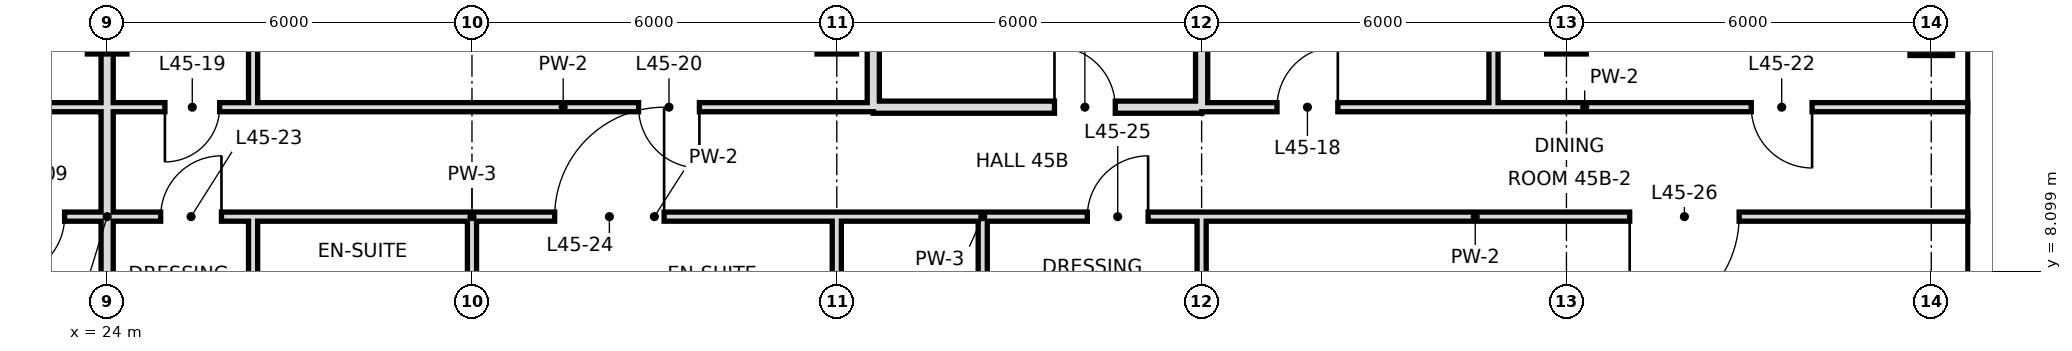
"""IFC4 building model, lengths in metres.
Left out: names, types, materials, properties, quantities, classifications, styles, units other than length and angle.
Written with IfcOpenShell. Run it as: python <this file> out.ifc"""

import sys

from ifc_helpers import new_model, si_unit, direction, frame, frame_2d, origin, origin_2d, place, context, subcontext, project, spatial, rectangle, hollow_rectangle, extrude, element, fill, save


model = new_model("IFC4")
c1 = context("Model", 3, precision=1e-05, world=origin(), true_north=direction((0.0, 1.0)))
c2 = subcontext(c1, "Body", "Model", "MODEL_VIEW")
j1 = project(units=[si_unit("LENGTHUNIT", "METRE"), si_unit("PLANEANGLEUNIT", "RADIAN")], contexts=[c1])
p1 = place(None, origin())
s1 = spatial("IfcSite", under=j1, at=p1, CompositionType="ELEMENT")
p2 = place(p1, origin())
s2 = spatial("IfcBuilding", under=s1, at=p2, CompositionType="ELEMENT")
p3 = place(p2, frame((0.0, 0.0, 195.6)))
s3 = spatial("IfcBuildingStorey", under=s2, at=p3, CompositionType="ELEMENT", Elevation=195.6)
for number, where, z_axis, x_axis in (
    (1, (24.0, 12.0, 0.0), (0.0, 0.0, 1.0), (1.0, 0.0, 0.0)),
    (2, (36.0, 12.0, 0.0), (0.0, 0.0, 1.0), (1.0, 0.0, 0.0)),
    (3, (48.0, 12.0, 0.0), (0.0, 0.0, 1.0), (1.0, 0.0, 0.0)),
):
    element("IfcColumn", number, at=place(p3, frame(where, z_axis=z_axis, x_axis=x_axis)), inside=s3, PredefinedType="COLUMN", context=c2, shape_type="SweptSolid", body=[
        extrude(hollow_rectangle(XDim=0.65, YDim=0.65, WallThickness=0.032, at=origin_2d()), origin(), (0.0, 0.0, 1.0), 3.6),
    ])
p4 = place(p3, frame((54.0, 12.0, 0.0), z_axis=(0.0, 0.0, 1.0), x_axis=(1.0, 0.0, 0.0)))
e4 = element("IfcColumn", 4, at=p4, inside=s3, PredefinedType="COLUMN", context=c2, shape_type="SweptSolid", body=[
    extrude(hollow_rectangle(XDim=0.7, YDim=0.7, WallThickness=0.036, at=origin_2d()), origin(), (0.0, 0.0, 1.0), 3.6),
])
p5 = place(p3, frame((24.0, 0.0, 0.0), z_axis=(0.0, 0.0, 1.0), x_axis=(0.0, 1.0, 0.0)))
e5 = element("IfcWall", 5, at=p5, inside=s3, PredefinedType="SOLIDWALL", context=c2, shape_type="SweptSolid", body=[
    extrude(rectangle(XDim=15.3, YDim=0.2, at=frame_2d((7.65, 0.0))), origin(), (0.0, 0.0, 1.0), 2.72),
])
p6 = place(p3, frame((26.4, 6.0, 0.0), z_axis=(0.0, 0.0, 1.0), x_axis=(0.0, 1.0, 0.0)))
e6 = element("IfcWall", 6, at=p6, inside=s3, PredefinedType="PARTITIONING", context=c2, shape_type="SweptSolid", body=[
    extrude(rectangle(XDim=3.0, YDim=0.15, at=frame_2d((1.5, 0.0))), origin(), (0.0, 0.0, 1.0), 3.42),
])
p7 = place(p3, frame((26.4, 10.8, 0.0), z_axis=(0.0, 0.0, 1.0), x_axis=(0.0, 1.0, 0.0)))
e7 = element("IfcWall", 7, at=p7, inside=s3, PredefinedType="PARTITIONING", context=c2, shape_type="SweptSolid", body=[
    extrude(rectangle(XDim=4.5, YDim=0.15, at=frame_2d((2.25, 0.0))), origin(), (0.0, 0.0, 1.0), 3.42),
])
for number, where, z_axis, x_axis in (
    (8, (30.0, 6.0, 0.0), (0.0, 0.0, 1.0), (0.0, 1.0, 0.0)),
    (9, (36.0, 6.0, 0.0), (0.0, 0.0, 1.0), (0.0, 1.0, 0.0)),
):
    element("IfcWall", number, at=place(p3, frame(where, z_axis=z_axis, x_axis=x_axis)), inside=s3, PredefinedType="PARTITIONING", context=c2, shape_type="SweptSolid", body=[
        extrude(rectangle(XDim=3.0, YDim=0.15, at=frame_2d((1.5, 0.0))), origin(), (0.0, 0.0, 1.0), 2.72),
    ])
p8 = place(p3, frame((36.6, 10.8, 0.0), z_axis=(0.0, 0.0, 1.0), x_axis=(0.0, 1.0, 0.0)))
e10 = element("IfcWall", 10, at=p8, inside=s3, PredefinedType="SOLIDWALL", context=c2, shape_type="SweptSolid", body=[
    extrude(rectangle(XDim=4.5, YDim=0.2, at=frame_2d((2.25, 0.0))), origin(), (0.0, 0.0, 1.0), 2.72),
])
p9 = place(p3, frame((38.4, 6.0, 0.0), z_axis=(0.0, 0.0, 1.0), x_axis=(0.0, 1.0, 0.0)))
e11 = element("IfcWall", 11, at=p9, inside=s3, PredefinedType="PARTITIONING", context=c2, shape_type="SweptSolid", body=[
    extrude(rectangle(XDim=3.0, YDim=0.15, at=frame_2d((1.5, 0.0))), origin(), (0.0, 0.0, 1.0), 3.42),
])
p10 = place(p3, frame((42.0, 10.8, 0.0), z_axis=(0.0, 0.0, 1.0), x_axis=(0.0, 1.0, 0.0)))
e12 = element("IfcWall", 12, at=p10, inside=s3, PredefinedType="SOLIDWALL", context=c2, shape_type="SweptSolid", body=[
    extrude(rectangle(XDim=4.5, YDim=0.2, at=frame_2d((2.25, 0.0))), origin(), (0.0, 0.0, 1.0), 2.72),
])
p11 = place(p3, frame((42.0, -0.6, 0.0), z_axis=(0.0, 0.0, 1.0), x_axis=(0.0, 1.0, 0.0)))
e13 = element("IfcWall", 13, at=p11, inside=s3, PredefinedType="PARTITIONING", context=c2, shape_type="SweptSolid", body=[
    extrude(rectangle(XDim=9.6, YDim=0.15, at=frame_2d((4.8, 0.0))), origin(), (0.0, 0.0, 1.0), 2.72),
])
p12 = place(p3, frame((46.8, 10.8, 0.0), z_axis=(0.0, 0.0, 1.0), x_axis=(0.0, 1.0, 0.0)))
e14 = element("IfcWall", 14, at=p12, inside=s3, PredefinedType="PARTITIONING", context=c2, shape_type="SweptSolid", body=[
    extrude(rectangle(XDim=4.5, YDim=0.15, at=frame_2d((2.25, 0.0))), origin(), (0.0, 0.0, 1.0), 3.42),
])
p13 = place(p3, frame((36.6, 10.8, 0.0), z_axis=(0.0, 0.0, 1.0), x_axis=(1.0, 0.0, 0.0)))
e15 = element("IfcWall", 15, at=p13, inside=s3, PredefinedType="SOLIDWALL", context=c2, shape_type="SweptSolid", body=[
    extrude(rectangle(XDim=5.4, YDim=0.2, at=frame_2d((2.7, 0.0))), origin(), (0.0, 0.0, 1.0), 2.72),
])
p14 = place(p13, frame((2.98, 0.0, 0.0)))
e16 = element("IfcOpeningElement", 16, at=p14, cuts=e15, PredefinedType="OPENING", context=c2, shape_type="SweptSolid", body=[
    extrude(rectangle(XDim=1.0, YDim=2.4, at=frame_2d((0.5, 1.2))), frame((0.0, 0.11, 0.0), z_axis=(0.0, -1.0, 0.0), x_axis=(1.0, 0.0, 0.0)), (0.0, 0.0, 1.0), 0.22),
])
p15 = place(p3, frame((7.8, 10.8, 0.0), z_axis=(0.0, 0.0, 1.0), x_axis=(1.0, 0.0, 0.0)))
e17 = element("IfcWall", 17, at=p15, inside=s3, PredefinedType="PARTITIONING", context=c2, shape_type="SweptSolid", body=[
    extrude(rectangle(XDim=16.2, YDim=0.15, at=frame_2d((8.1, 0.0))), origin(), (0.0, 0.0, 1.0), 3.42),
])
p16 = place(p15, frame((2.5, 0.0, 0.0)))
e18 = element("IfcOpeningElement", 18, at=p16, cuts=e17, PredefinedType="OPENING", context=c2, shape_type="SweptSolid", body=[
    extrude(rectangle(XDim=1.0, YDim=2.4, at=frame_2d((0.5, 1.2))), frame((0.0, 0.085, 0.0), z_axis=(0.0, -1.0, 0.0), x_axis=(1.0, 0.0, 0.0)), (0.0, 0.0, 1.0), 0.17),
])
p17 = place(p15, frame((8.86, 0.0, 0.0)))
e19 = element("IfcOpeningElement", 19, at=p17, cuts=e17, PredefinedType="OPENING", context=c2, shape_type="SweptSolid", body=[
    extrude(rectangle(XDim=1.0, YDim=2.4, at=frame_2d((0.5, 1.2))), frame((0.0, 0.085, 0.0), z_axis=(0.0, -1.0, 0.0), x_axis=(1.0, 0.0, 0.0)), (0.0, 0.0, 1.0), 0.17),
])
p18 = place(p3, frame((26.4, 10.8, 0.0), z_axis=(0.0, 0.0, 1.0), x_axis=(1.0, 0.0, 0.0)))
e20 = element("IfcWall", 20, at=p18, inside=s3, PredefinedType="PARTITIONING", context=c2, shape_type="SweptSolid", body=[
    extrude(rectangle(XDim=10.2, YDim=0.15, at=frame_2d((5.1, 0.0))), origin(), (0.0, 0.0, 1.0), 3.42),
])
p19 = place(p18, frame((6.34, 0.0, 0.0)))
e21 = element("IfcOpeningElement", 21, at=p19, cuts=e20, PredefinedType="OPENING", context=c2, shape_type="SweptSolid", body=[
    extrude(rectangle(XDim=1.0, YDim=2.4, at=frame_2d((0.5, 1.2))), frame((0.0, 0.085, 0.0), z_axis=(0.0, -1.0, 0.0), x_axis=(1.0, 0.0, 0.0)), (0.0, 0.0, 1.0), 0.17),
])
p20 = place(p3, frame((42.0, 10.8, 0.0), z_axis=(0.0, 0.0, 1.0), x_axis=(1.0, 0.0, 0.0)))
e22 = element("IfcWall", 22, at=p20, inside=s3, PredefinedType="PARTITIONING", context=c2, shape_type="SweptSolid", body=[
    extrude(rectangle(XDim=12.6, YDim=0.15, at=frame_2d((6.3, 0.0))), origin(), (0.0, 0.0, 1.0), 3.42),
])
p21 = place(p20, frame((1.24, 0.0, 0.0)))
e23 = element("IfcOpeningElement", 23, at=p21, cuts=e22, PredefinedType="OPENING", context=c2, shape_type="SweptSolid", body=[
    extrude(rectangle(XDim=1.0, YDim=2.4, at=frame_2d((0.5, 1.2))), frame((0.0, 0.085, 0.0), z_axis=(0.0, -1.0, 0.0), x_axis=(1.0, 0.0, 0.0)), (0.0, 0.0, 1.0), 0.17),
])
p22 = place(p20, frame((9.04, 0.0, 0.0)))
e24 = element("IfcOpeningElement", 24, at=p22, cuts=e22, PredefinedType="OPENING", context=c2, shape_type="SweptSolid", body=[
    extrude(rectangle(XDim=1.0, YDim=2.4, at=frame_2d((0.5, 1.2))), frame((0.0, 0.085, 0.0), z_axis=(0.0, -1.0, 0.0), x_axis=(1.0, 0.0, 0.0)), (0.0, 0.0, 1.0), 0.17),
])
p23 = place(p3, frame((24.0, 10.8, 0.0), z_axis=(0.0, 0.0, 1.0), x_axis=(1.0, 0.0, 0.0)))
e25 = element("IfcWall", 25, at=p23, inside=s3, PredefinedType="PARTITIONING", context=c2, shape_type="SweptSolid", body=[
    extrude(rectangle(XDim=2.4, YDim=0.15, at=frame_2d((1.2, 0.0))), origin(), (0.0, 0.0, 1.0), 3.42),
])
p24 = place(p23, frame((0.95, 0.0, 0.0)))
e26 = element("IfcOpeningElement", 26, at=p24, cuts=e25, PredefinedType="OPENING", context=c2, shape_type="SweptSolid", body=[
    extrude(rectangle(XDim=0.9, YDim=2.4, at=frame_2d((0.45, 1.2))), frame((0.0, 0.085, 0.0), z_axis=(0.0, -1.0, 0.0), x_axis=(1.0, 0.0, 0.0)), (0.0, 0.0, 1.0), 0.17),
])
p25 = place(p3, frame((21.6, 9.0, 0.0), z_axis=(0.0, 0.0, 1.0), x_axis=(1.0, 0.0, 0.0)))
e27 = element("IfcWall", 27, at=p25, inside=s3, PredefinedType="PARTITIONING", context=c2, shape_type="SweptSolid", body=[
    extrude(rectangle(XDim=4.8, YDim=0.15, at=frame_2d((2.4, 0.0))), origin(), (0.0, 0.0, 1.0), 3.42),
])
p26 = place(p25, frame((0.7, 0.0, 0.0)))
e28 = element("IfcOpeningElement", 28, at=p26, cuts=e27, PredefinedType="OPENING", context=c2, shape_type="SweptSolid", body=[
    extrude(rectangle(XDim=1.0, YDim=2.4, at=frame_2d((0.5, 1.2))), frame((0.0, 0.085, 0.0), z_axis=(0.0, -1.0, 0.0), x_axis=(1.0, 0.0, 0.0)), (0.0, 0.0, 1.0), 0.17),
])
p27 = place(p25, frame((3.28, 0.0, 0.0)))
e29 = element("IfcOpeningElement", 29, at=p27, cuts=e27, PredefinedType="OPENING", context=c2, shape_type="SweptSolid", body=[
    extrude(rectangle(XDim=1.0, YDim=2.4, at=frame_2d((0.5, 1.2))), frame((0.0, 0.085, 0.0), z_axis=(0.0, -1.0, 0.0), x_axis=(1.0, 0.0, 0.0)), (0.0, 0.0, 1.0), 0.17),
])
p28 = place(p3, frame((30.0, 9.0, 0.0), z_axis=(0.0, 0.0, 1.0), x_axis=(1.0, 0.0, 0.0)))
e30 = element("IfcWall", 30, at=p28, inside=s3, PredefinedType="PARTITIONING", context=c2, shape_type="SweptSolid", body=[
    extrude(rectangle(XDim=6.0, YDim=0.15, at=frame_2d((3.0, 0.0))), origin(), (0.0, 0.0, 1.0), 3.42),
])
p29 = place(p28, frame((1.36, 0.0, 0.0)))
e31 = element("IfcOpeningElement", 31, at=p29, cuts=e30, PredefinedType="OPENING", context=c2, shape_type="SweptSolid", body=[
    extrude(rectangle(XDim=1.8, YDim=2.4, at=frame_2d((0.9, 1.2))), frame((0.0, 0.085, 0.0), z_axis=(0.0, -1.0, 0.0), x_axis=(1.0, 0.0, 0.0)), (0.0, 0.0, 1.0), 0.17),
])
p30 = place(p3, frame((38.4, 9.0, 0.0), z_axis=(0.0, 0.0, 1.0), x_axis=(1.0, 0.0, 0.0)))
e32 = element("IfcWall", 32, at=p30, inside=s3, PredefinedType="PARTITIONING", context=c2, shape_type="SweptSolid", body=[
    extrude(rectangle(XDim=16.2, YDim=0.15, at=frame_2d((8.1, 0.0))), origin(), (0.0, 0.0, 1.0), 3.42),
])
p31 = place(p30, frame((1.72, 0.0, 0.0)))
e33 = element("IfcOpeningElement", 33, at=p31, cuts=e32, PredefinedType="OPENING", context=c2, shape_type="SweptSolid", body=[
    extrude(rectangle(XDim=1.0, YDim=2.4, at=frame_2d((0.5, 1.2))), frame((0.0, 0.085, 0.0), z_axis=(0.0, -1.0, 0.0), x_axis=(1.0, 0.0, 0.0)), (0.0, 0.0, 1.0), 0.17),
])
p32 = place(p30, frame((10.64, 0.0, 0.0)))
e34 = element("IfcOpeningElement", 34, at=p32, cuts=e32, PredefinedType="OPENING", context=c2, shape_type="SweptSolid", body=[
    extrude(rectangle(XDim=1.8, YDim=2.4, at=frame_2d((0.9, 1.2))), frame((0.0, 0.085, 0.0), z_axis=(0.0, -1.0, 0.0), x_axis=(1.0, 0.0, 0.0)), (0.0, 0.0, 1.0), 0.17),
])
p33 = place(p3, frame((26.4, 9.0, 0.0), z_axis=(0.0, 0.0, 1.0), x_axis=(1.0, 0.0, 0.0)))
e35 = element("IfcWall", 35, at=p33, inside=s3, PredefinedType="PARTITIONING", context=c2, shape_type="SweptSolid", body=[
    extrude(rectangle(XDim=3.6, YDim=0.15, at=frame_2d((1.8, 0.0))), origin(), (0.0, 0.0, 1.0), 3.42),
])
p34 = place(p3, frame((36.0, 9.0, 0.0), z_axis=(0.0, 0.0, 1.0), x_axis=(1.0, 0.0, 0.0)))
e36 = element("IfcWall", 36, at=p34, inside=s3, PredefinedType="PARTITIONING", context=c2, shape_type="SweptSolid", body=[
    extrude(rectangle(XDim=2.4, YDim=0.15, at=frame_2d((1.2, 0.0))), origin(), (0.0, 0.0, 1.0), 3.42),
])
p35 = place(p26, frame((1.0, 0.0, 0.0), z_axis=(0.0, 0.0, 1.0), x_axis=(-1.0, 0.0, 0.0)))
e37 = element("IfcDoor", 37, at=p35, inside=s3, OperationType="SINGLE_SWING_RIGHT", PredefinedType="DOOR", context=c2, shape_type="SweptSolid", body=[
    extrude(rectangle(XDim=1.0, YDim=2.4, at=frame_2d((0.5, 1.2))), frame((0.0, 0.025, 0.0), z_axis=(0.0, -1.0, 0.0), x_axis=(1.0, 0.0, 0.0)), (0.0, 0.0, 1.0), 0.05),
])
fill(e28, e37)
p36 = place(p21, frame((1.0, 0.0, 0.0), z_axis=(0.0, 0.0, 1.0), x_axis=(-1.0, 0.0, 0.0)))
e38 = element("IfcDoor", 38, at=p36, inside=s3, OperationType="SINGLE_SWING_LEFT", PredefinedType="DOOR", context=c2, shape_type="SweptSolid", body=[
    extrude(rectangle(XDim=1.0, YDim=2.4, at=frame_2d((0.5, 1.2))), frame((0.0, 0.025, 0.0), z_axis=(0.0, -1.0, 0.0), x_axis=(1.0, 0.0, 0.0)), (0.0, 0.0, 1.0), 0.05),
])
fill(e23, e38)
p37 = place(p24, frame((0.9, 0.0, 0.0), z_axis=(0.0, 0.0, 1.0), x_axis=(-1.0, 0.0, 0.0)))
e39 = element("IfcDoor", 39, at=p37, inside=s3, OperationType="SINGLE_SWING_RIGHT", PredefinedType="DOOR", context=c2, shape_type="SweptSolid", body=[
    extrude(rectangle(XDim=0.9, YDim=2.4, at=frame_2d((0.45, 1.2))), frame((0.0, 0.025, 0.0), z_axis=(0.0, -1.0, 0.0), x_axis=(1.0, 0.0, 0.0)), (0.0, 0.0, 1.0), 0.05),
])
fill(e26, e39)
p38 = place(p19, origin())
e40 = element("IfcDoor", 40, at=p38, inside=s3, OperationType="SINGLE_SWING_RIGHT", PredefinedType="DOOR", context=c2, shape_type="SweptSolid", body=[
    extrude(rectangle(XDim=1.0, YDim=2.4, at=frame_2d((0.5, 1.2))), frame((0.0, 0.025, 0.0), z_axis=(0.0, -1.0, 0.0), x_axis=(1.0, 0.0, 0.0)), (0.0, 0.0, 1.0), 0.05),
])
fill(e21, e40)
p39 = place(p14, origin())
e41 = element("IfcDoor", 41, at=p39, inside=s3, OperationType="SINGLE_SWING_LEFT", PredefinedType="DOOR", context=c2, shape_type="SweptSolid", body=[
    extrude(rectangle(XDim=1.0, YDim=2.4, at=frame_2d((0.5, 1.2))), frame((0.0, 0.025, 0.0), z_axis=(0.0, -1.0, 0.0), x_axis=(1.0, 0.0, 0.0)), (0.0, 0.0, 1.0), 0.05),
])
fill(e16, e41)
p40 = place(p22, origin())
e42 = element("IfcDoor", 42, at=p40, inside=s3, OperationType="SINGLE_SWING_RIGHT", PredefinedType="DOOR", context=c2, shape_type="SweptSolid", body=[
    extrude(rectangle(XDim=1.0, YDim=2.4, at=frame_2d((0.5, 1.2))), frame((0.0, 0.025, 0.0), z_axis=(0.0, -1.0, 0.0), x_axis=(1.0, 0.0, 0.0)), (0.0, 0.0, 1.0), 0.05),
])
fill(e24, e42)
p41 = place(p27, frame((1.0, 0.0, 0.0), z_axis=(0.0, 0.0, 1.0), x_axis=(-1.0, 0.0, 0.0)))
e43 = element("IfcDoor", 43, at=p41, inside=s3, OperationType="SINGLE_SWING_LEFT", PredefinedType="DOOR", context=c2, shape_type="SweptSolid", body=[
    extrude(rectangle(XDim=1.0, YDim=2.4, at=frame_2d((0.5, 1.2))), frame((0.0, 0.025, 0.0), z_axis=(0.0, -1.0, 0.0), x_axis=(1.0, 0.0, 0.0)), (0.0, 0.0, 1.0), 0.05),
])
fill(e29, e43)
p42 = place(p29, frame((1.8, 0.0, 0.0), z_axis=(0.0, 0.0, 1.0), x_axis=(-1.0, 0.0, 0.0)))
e44 = element("IfcDoor", 44, at=p42, inside=s3, OperationType="SINGLE_SWING_LEFT", PredefinedType="DOOR", context=c2, shape_type="SweptSolid", body=[
    extrude(rectangle(XDim=1.8, YDim=2.4, at=frame_2d((0.9, 1.2))), frame((0.0, 0.025, 0.0), z_axis=(0.0, -1.0, 0.0), x_axis=(1.0, 0.0, 0.0)), (0.0, 0.0, 1.0), 0.05),
])
fill(e31, e44)
p43 = place(p31, frame((1.0, 0.0, 0.0), z_axis=(0.0, 0.0, 1.0), x_axis=(-1.0, 0.0, 0.0)))
e45 = element("IfcDoor", 45, at=p43, inside=s3, OperationType="SINGLE_SWING_LEFT", PredefinedType="DOOR", context=c2, shape_type="SweptSolid", body=[
    extrude(rectangle(XDim=1.0, YDim=2.4, at=frame_2d((0.5, 1.2))), frame((0.0, 0.025, 0.0), z_axis=(0.0, -1.0, 0.0), x_axis=(1.0, 0.0, 0.0)), (0.0, 0.0, 1.0), 0.05),
])
fill(e33, e45)
p44 = place(p32, frame((1.8, 0.0, 0.0), z_axis=(0.0, 0.0, 1.0), x_axis=(-1.0, 0.0, 0.0)))
e46 = element("IfcDoor", 46, at=p44, inside=s3, OperationType="SINGLE_SWING_RIGHT", PredefinedType="DOOR", context=c2, shape_type="SweptSolid", body=[
    extrude(rectangle(XDim=1.8, YDim=2.4, at=frame_2d((0.9, 1.2))), frame((0.0, 0.025, 0.0), z_axis=(0.0, -1.0, 0.0), x_axis=(1.0, 0.0, 0.0)), (0.0, 0.0, 1.0), 0.05),
])
fill(e34, e46)
save(model, sys.argv[1])
